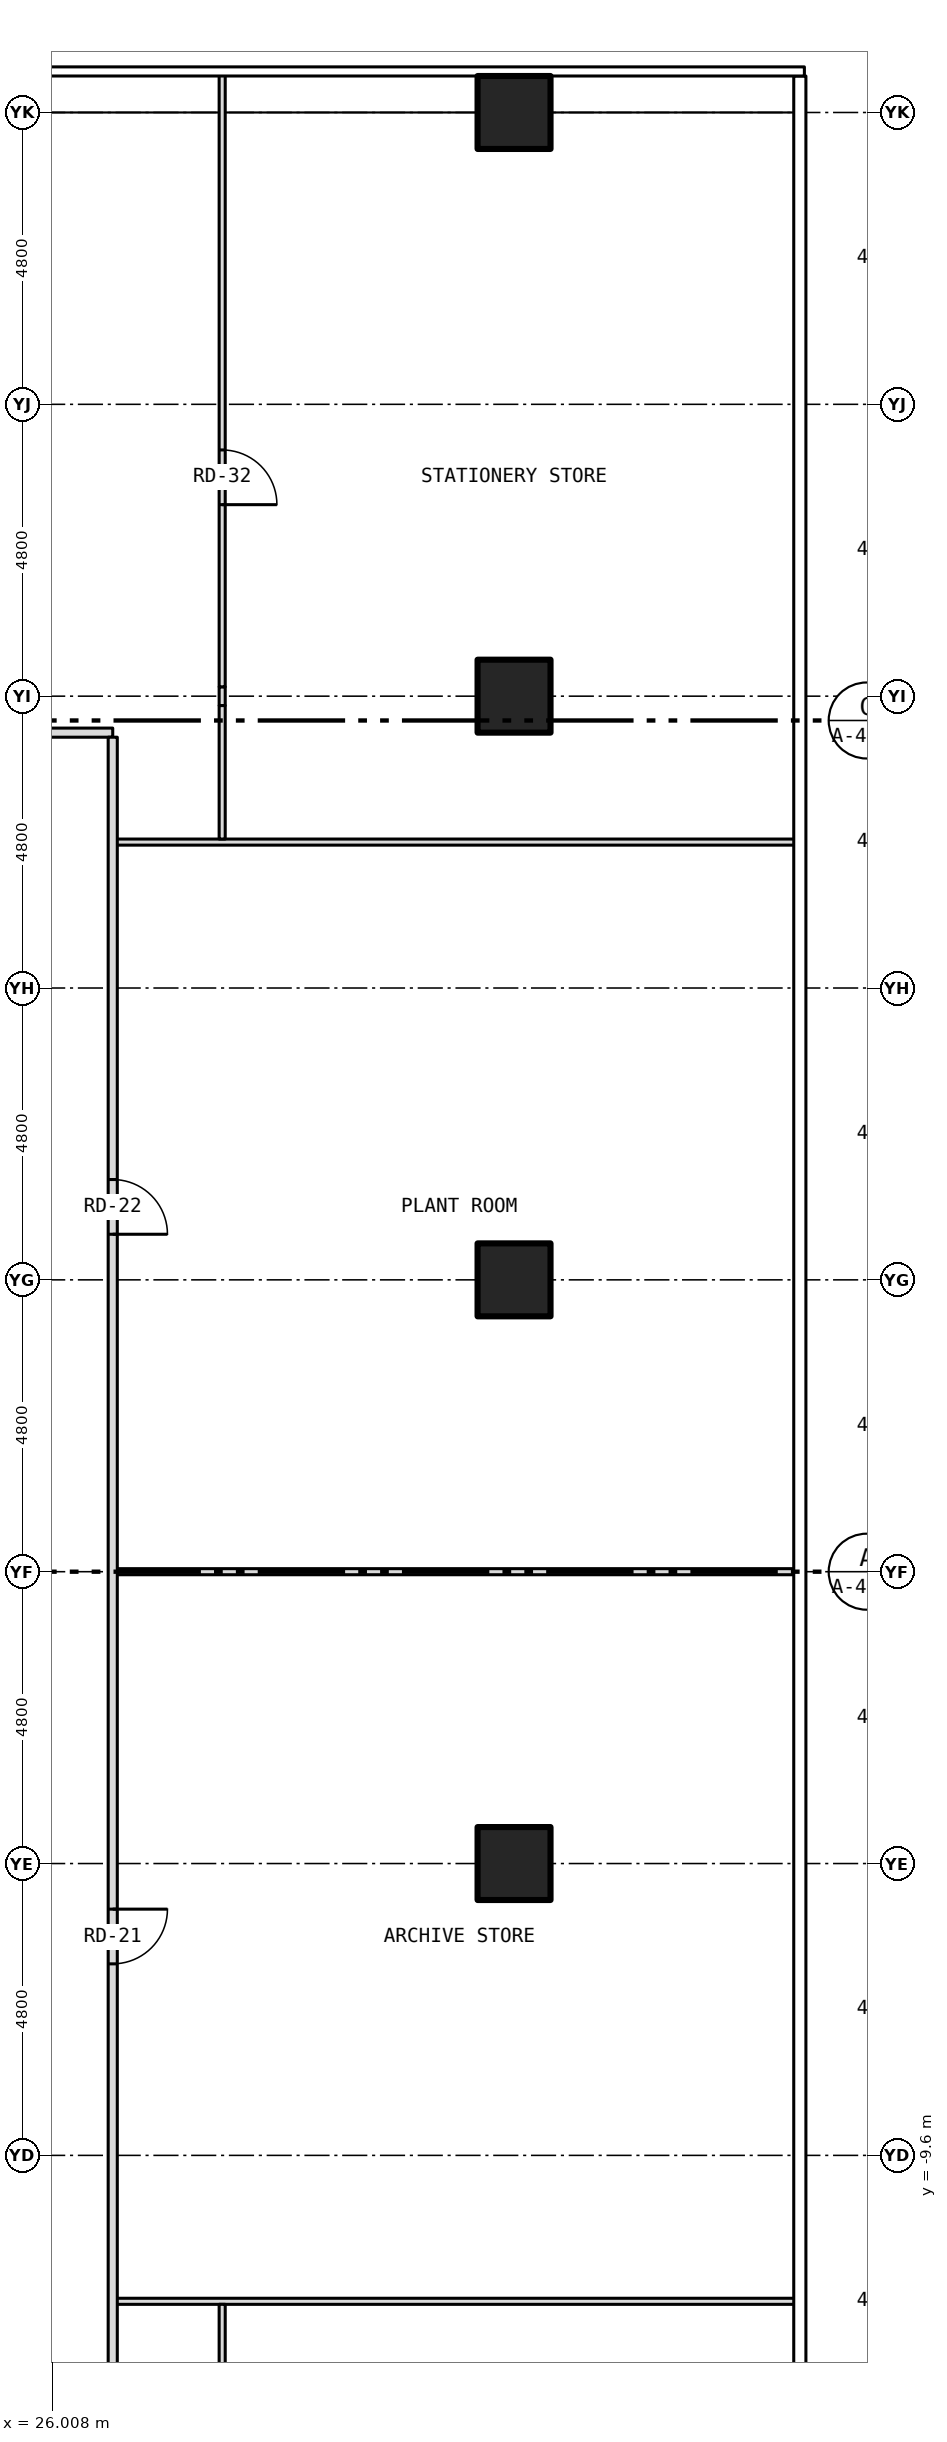
"""IFC4 building model, lengths in metres.
Left out: names, types, materials, properties, quantities, classifications, styles, units other than length and angle.
Written with IfcOpenShell. Run it as: python <this file> out.ifc"""

import sys

from ifc_helpers import new_model, si_unit, direction, frame, frame_2d, origin, origin_2d, place, context, subcontext, project, spatial, rectangle, hollow_rectangle, extrude, element, fill, save


model = new_model("IFC4")
c1 = context("Model", 3, precision=1e-05, world=origin(), true_north=direction((0.0, 1.0)))
c2 = subcontext(c1, "Body", "Model", "MODEL_VIEW")
j1 = project(units=[si_unit("LENGTHUNIT", "METRE"), si_unit("PLANEANGLEUNIT", "RADIAN")], contexts=[c1])
p1 = place(None, origin())
s1 = spatial("IfcSite", under=j1, at=p1, CompositionType="ELEMENT")
p2 = place(p1, origin())
s2 = spatial("IfcBuilding", under=s1, at=p2, CompositionType="ELEMENT")
p3 = place(p2, frame((0.0, 0.0, 15.5)))
s3 = spatial("IfcBuildingStorey", under=s2, at=p3, CompositionType="ELEMENT", Elevation=15.5)
for number, where, z_axis, x_axis in (
    (1, (33.6, -4.8, -0.2), (0.0, 0.0, 1.0), (1.0, 0.0, 0.0)),
    (2, (33.6, 4.8, -0.2), (0.0, 0.0, 1.0), (1.0, 0.0, 0.0)),
    (3, (33.6, 14.4, -0.2), (0.0, 0.0, 1.0), (1.0, 0.0, 0.0)),
    (4, (33.6, 24.0, -0.2), (0.0, 0.0, 1.0), (1.0, 0.0, 0.0)),
):
    element("IfcColumn", number, at=place(p3, frame(where, z_axis=z_axis, x_axis=x_axis)), inside=s3, PredefinedType="COLUMN", context=c2, shape_type="SweptSolid", body=[
        extrude(hollow_rectangle(XDim=1.2, YDim=1.2, WallThickness=0.07, at=origin_2d()), origin(), (0.0, 0.0, 1.0), 4.5),
    ])
for number, where, z_axis, x_axis in (
    (5, (27.0, -12.0, 0.0), (0.0, 0.0, 1.0), (1.0, 0.0, 0.0)),
    (6, (27.0, 0.0, 0.0), (0.0, 0.0, 1.0), (1.0, 0.0, 0.0)),
    (7, (27.0, 12.0, 0.0), (0.0, 0.0, 1.0), (1.0, 0.0, 0.0)),
):
    element("IfcWall", number, at=place(p3, frame(where, z_axis=z_axis, x_axis=x_axis)), inside=s3, PredefinedType="PARTITIONING", context=c2, shape_type="SweptSolid", body=[
        extrude(rectangle(XDim=11.28, YDim=0.1, at=frame_2d((5.64, 0.0))), origin(), (0.0, 0.0, 1.0), 4.3),
    ])
p4 = place(p3, frame((-27.0, 13.8, 0.0), z_axis=(0.0, 0.0, 1.0), x_axis=(1.0, 0.0, 0.0)))
e8 = element("IfcWall", 8, at=p4, inside=s3, PredefinedType="PARTITIONING", context=c2, shape_type="SweptSolid", body=[
    extrude(rectangle(XDim=54.0, YDim=0.15, at=frame_2d((27.0, 0.0))), origin(), (0.0, 0.0, 1.0), 4.3),
])
p5 = place(p4, frame((29.001, 0.0, 0.0)))
e9 = element("IfcOpeningElement", 9, at=p5, cuts=e8, PredefinedType="OPENING", context=c2, shape_type="SweptSolid", body=[
    extrude(rectangle(XDim=0.9, YDim=2.1, at=frame_2d((0.45, 1.05))), frame((0.0, 0.087, 0.0), z_axis=(0.0, -1.0, 0.0), x_axis=(1.0, 0.0, 0.0)), (0.0, 0.0, 1.0), 0.174),
])
p6 = place(p4, frame((33.801, 0.0, 0.0)))
e10 = element("IfcOpeningElement", 10, at=p6, cuts=e8, PredefinedType="OPENING", context=c2, shape_type="SweptSolid", body=[
    extrude(rectangle(XDim=0.9, YDim=2.1, at=frame_2d((0.45, 1.05))), frame((0.0, 0.087, 0.0), z_axis=(0.0, -1.0, 0.0), x_axis=(1.0, 0.0, 0.0)), (0.0, 0.0, 1.0), 0.174),
])
p7 = place(p4, frame((38.601, 0.0, 0.0)))
e11 = element("IfcOpeningElement", 11, at=p7, cuts=e8, PredefinedType="OPENING", context=c2, shape_type="SweptSolid", body=[
    extrude(rectangle(XDim=0.9, YDim=2.1, at=frame_2d((0.45, 1.05))), frame((0.0, 0.087, 0.0), z_axis=(0.0, -1.0, 0.0), x_axis=(1.0, 0.0, 0.0)), (0.0, 0.0, 1.0), 0.174),
])
p8 = place(p4, frame((43.401, 0.0, 0.0)))
e12 = element("IfcOpeningElement", 12, at=p8, cuts=e8, PredefinedType="OPENING", context=c2, shape_type="SweptSolid", body=[
    extrude(rectangle(XDim=0.9, YDim=2.1, at=frame_2d((0.45, 1.05))), frame((0.0, 0.087, 0.0), z_axis=(0.0, -1.0, 0.0), x_axis=(1.0, 0.0, 0.0)), (0.0, 0.0, 1.0), 0.174),
])
p9 = place(p4, frame((9.801, 0.0, 0.0)))
e13 = element("IfcOpeningElement", 13, at=p9, cuts=e8, PredefinedType="OPENING", context=c2, shape_type="SweptSolid", body=[
    extrude(rectangle(XDim=0.9, YDim=2.1, at=frame_2d((0.45, 1.05))), frame((0.0, 0.087, 0.0), z_axis=(0.0, -1.0, 0.0), x_axis=(1.0, 0.0, 0.0)), (0.0, 0.0, 1.0), 0.174),
])
p10 = place(p4, frame((14.601, 0.0, 0.0)))
e14 = element("IfcOpeningElement", 14, at=p10, cuts=e8, PredefinedType="OPENING", context=c2, shape_type="SweptSolid", body=[
    extrude(rectangle(XDim=0.9, YDim=2.1, at=frame_2d((0.45, 1.05))), frame((0.0, 0.087, 0.0), z_axis=(0.0, -1.0, 0.0), x_axis=(1.0, 0.0, 0.0)), (0.0, 0.0, 1.0), 0.174),
])
p11 = place(p4, frame((20.095, 0.0, 0.0)))
e15 = element("IfcOpeningElement", 15, at=p11, cuts=e8, PredefinedType="OPENING", context=c2, shape_type="SweptSolid", body=[
    extrude(rectangle(XDim=0.9, YDim=2.1, at=frame_2d((0.45, 1.05))), frame((0.0, 0.087, 0.0), z_axis=(0.0, -1.0, 0.0), x_axis=(1.0, 0.0, 0.0)), (0.0, 0.0, 1.0), 0.174),
])
p12 = place(p4, frame((3.75, 0.0, 0.0)))
e16 = element("IfcOpeningElement", 16, at=p12, cuts=e8, PredefinedType="OPENING", context=c2, shape_type="SweptSolid", body=[
    extrude(rectangle(XDim=0.9, YDim=2.1, at=frame_2d((0.45, 1.05))), frame((0.0, 0.087, 0.0), z_axis=(0.0, -1.0, 0.0), x_axis=(1.0, 0.0, 0.0)), (0.0, 0.0, 1.0), 0.174),
])
p13 = place(p4, frame((49.35, 0.0, 0.0)))
e17 = element("IfcOpeningElement", 17, at=p13, cuts=e8, PredefinedType="OPENING", context=c2, shape_type="SweptSolid", body=[
    extrude(rectangle(XDim=0.9, YDim=2.1, at=frame_2d((0.45, 1.05))), frame((0.0, 0.087, 0.0), z_axis=(0.0, -1.0, 0.0), x_axis=(1.0, 0.0, 0.0)), (0.0, 0.0, 1.0), 0.174),
])
p14 = place(p4, frame((24.303, 0.0, 0.0)))
e18 = element("IfcOpeningElement", 18, at=p14, cuts=e8, PredefinedType="OPENING", context=c2, shape_type="SweptSolid", body=[
    extrude(rectangle(XDim=0.9, YDim=2.1, at=frame_2d((0.45, 1.05))), frame((0.0, 0.087, 0.0), z_axis=(0.0, -1.0, 0.0), x_axis=(1.0, 0.0, 0.0)), (0.0, 0.0, 1.0), 0.174),
])
p15 = place(p3, frame((27.0, -13.725, 0.0), z_axis=(0.0, 0.0, 1.0), x_axis=(0.0, 1.0, 0.0)))
e19 = element("IfcWall", 19, at=p15, inside=s3, PredefinedType="PARTITIONING", context=c2, shape_type="SweptSolid", body=[
    extrude(rectangle(XDim=27.45, YDim=0.15, at=frame_2d((13.725, 0.0))), origin(), (0.0, 0.0, 1.0), 4.3),
])
p16 = place(p15, frame((7.275, 0.0, 0.0)))
e20 = element("IfcOpeningElement", 20, at=p16, cuts=e19, PredefinedType="OPENING", context=c2, shape_type="SweptSolid", body=[
    extrude(rectangle(XDim=0.9, YDim=2.1, at=frame_2d((0.45, 1.05))), frame((0.0, 0.087, 0.0), z_axis=(0.0, -1.0, 0.0), x_axis=(1.0, 0.0, 0.0)), (0.0, 0.0, 1.0), 0.174),
])
p17 = place(p15, frame((19.275, 0.0, 0.0)))
e21 = element("IfcOpeningElement", 21, at=p17, cuts=e19, PredefinedType="OPENING", context=c2, shape_type="SweptSolid", body=[
    extrude(rectangle(XDim=0.9, YDim=2.1, at=frame_2d((0.45, 1.05))), frame((0.0, 0.087, 0.0), z_axis=(0.0, -1.0, 0.0), x_axis=(1.0, 0.0, 0.0)), (0.0, 0.0, 1.0), 0.174),
])
for number, where, z_axis, x_axis in (
    (22, (28.8, -14.246, 0.0), (0.0, 0.0, 1.0), (0.0, 1.0, 0.0)),
    (23, (28.8, 12.05, 0.0), (0.0, 0.0, 1.0), (0.0, 1.0, 0.0)),
):
    element("IfcWall", number, at=place(p3, frame(where, z_axis=z_axis, x_axis=x_axis)), inside=s3, PredefinedType="PARTITIONING", context=c2, shape_type="SweptSolid", body=[
        extrude(rectangle(XDim=2.196, YDim=0.1, at=frame_2d((1.098, 0.0))), origin(), (0.0, 0.0, 1.0), 3.683),
    ])
p18 = place(p3, frame((28.8, 14.246, 0.0), z_axis=(0.0, 0.0, 1.0), x_axis=(0.0, 1.0, 0.0)))
e24 = element("IfcWall", 24, at=p18, inside=s3, PredefinedType="PARTITIONING", context=c2, shape_type="SweptSolid", body=[
    extrude(rectangle(XDim=0.308, YDim=0.1, at=frame_2d((0.154, 0.0))), origin(), (0.0, 0.0, 1.0), 4.3),
])
p19 = place(p3, frame((28.8, 14.554, 0.0), z_axis=(0.0, 0.0, 1.0), x_axis=(0.0, 1.0, 0.0)))
e25 = element("IfcWall", 25, at=p19, inside=s3, PredefinedType="PARTITIONING", context=c2, shape_type="SweptSolid", body=[
    extrude(rectangle(XDim=10.076, YDim=0.1, at=frame_2d((5.038, 0.0))), origin(), (0.0, 0.0, 1.0), 3.683),
])
p20 = place(p19, frame((2.996, 0.0, 0.0)))
e26 = element("IfcOpeningElement", 26, at=p20, cuts=e25, PredefinedType="OPENING", context=c2, shape_type="SweptSolid", body=[
    extrude(rectangle(XDim=0.9, YDim=2.1, at=frame_2d((0.45, 1.05))), frame((0.0, 0.062, 0.0), z_axis=(0.0, -1.0, 0.0), x_axis=(1.0, 0.0, 0.0)), (0.0, 0.0, 1.0), 0.124),
])
p21 = place(p16, origin())
e27 = element("IfcDoor", 27, at=p21, inside=s3, OperationType="SINGLE_SWING_RIGHT", PredefinedType="DOOR", context=c2, shape_type="SweptSolid", body=[
    extrude(rectangle(XDim=0.9, YDim=2.1, at=frame_2d((0.45, 1.05))), frame((0.0, 0.025, 0.0), z_axis=(0.0, -1.0, 0.0), x_axis=(1.0, 0.0, 0.0)), (0.0, 0.0, 1.0), 0.05),
])
fill(e20, e27)
p22 = place(p17, origin())
e28 = element("IfcDoor", 28, at=p22, inside=s3, OperationType="SINGLE_SWING_LEFT", PredefinedType="DOOR", context=c2, shape_type="SweptSolid", body=[
    extrude(rectangle(XDim=0.9, YDim=2.1, at=frame_2d((0.45, 1.05))), frame((0.0, 0.025, 0.0), z_axis=(0.0, -1.0, 0.0), x_axis=(1.0, 0.0, 0.0)), (0.0, 0.0, 1.0), 0.05),
])
fill(e21, e28)
p23 = place(p20, origin())
e29 = element("IfcDoor", 29, at=p23, inside=s3, OperationType="SINGLE_SWING_LEFT", PredefinedType="DOOR", context=c2, shape_type="SweptSolid", body=[
    extrude(rectangle(XDim=0.9, YDim=2.1, at=frame_2d((0.45, 1.05))), frame((0.0, 0.025, 0.0), z_axis=(0.0, -1.0, 0.0), x_axis=(1.0, 0.0, 0.0)), (0.0, 0.0, 1.0), 0.05),
])
fill(e26, e29)
save(model, sys.argv[1])
